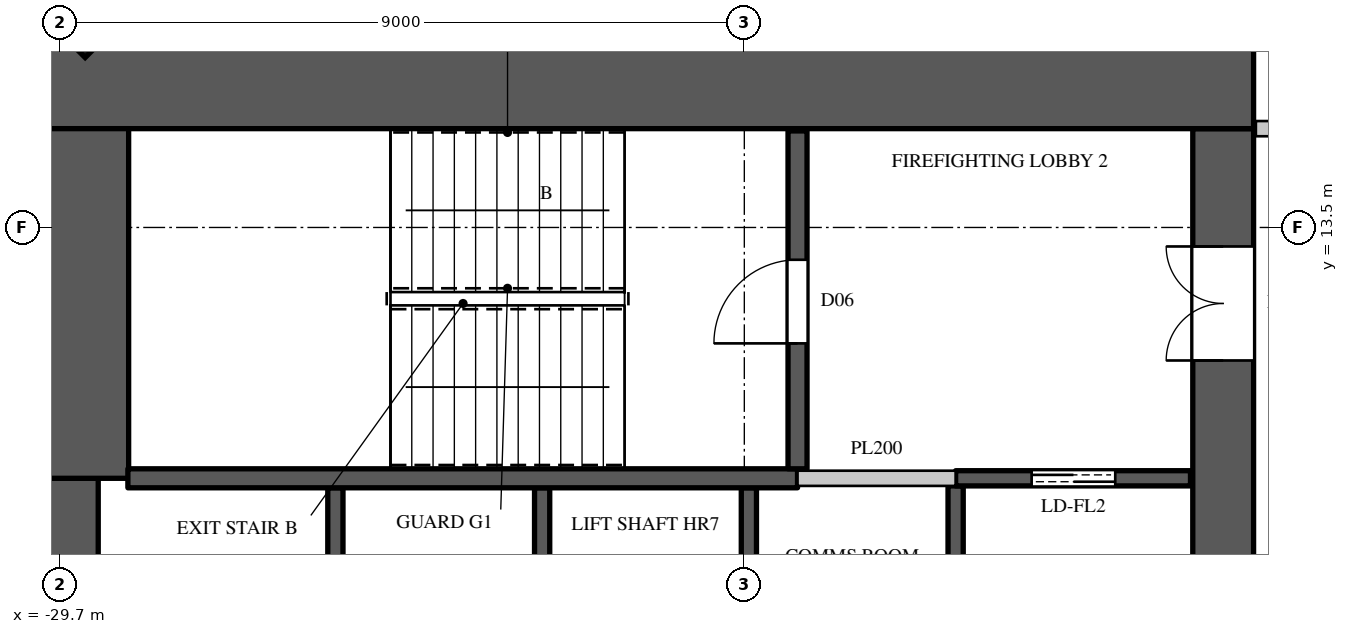
"""IFC4 building model, lengths in metres.
Left out: names, types, materials, properties, quantities, classifications, styles, units other than length and angle.
Written with IfcOpenShell. Run it as: python <this file> out.ifc"""

import sys

from ifc_helpers import new_model, si_unit, direction, frame, frame_2d, origin, origin_2d, place, context, subcontext, project, spatial, rectangle, extrude, element, fill, save


model = new_model("IFC4")
c1 = context("Model", 3, precision=1e-05, world=origin(), true_north=direction((0.0, 1.0)))
c2 = subcontext(c1, "Body", "Model", "MODEL_VIEW")
j1 = project(units=[si_unit("LENGTHUNIT", "METRE"), si_unit("PLANEANGLEUNIT", "RADIAN")], contexts=[c1])
p1 = place(None, origin())
s1 = spatial("IfcSite", under=j1, at=p1, CompositionType="ELEMENT")
p2 = place(p1, origin())
s2 = spatial("IfcBuilding", under=s1, at=p2, CompositionType="ELEMENT")
p3 = place(p2, frame((0.0, 0.0, 181.0)))
s3 = spatial("IfcBuildingStorey", under=s2, at=p3, CompositionType="ELEMENT", Elevation=181.0)
p4 = place(p3, frame((-29.443, 16.443, 0.0), z_axis=(0.0, 0.0, 1.0), x_axis=(-0.707106781187, -0.707106781187, 0.0)))
e1 = element("IfcColumn", 1, at=p4, inside=s3, PredefinedType="COLUMN", context=c2, shape_type="SweptSolid", body=[
    extrude(rectangle(XDim=0.9, YDim=1.1, at=origin_2d()), origin(), (0.0, 0.0, 1.0), 4.1),
])
p5 = place(p3, frame((-30.0, 15.4, 0.0), z_axis=(0.0, 0.0, 1.0), x_axis=(1.0, 0.0, 0.0)))
e2 = element("IfcWall", 2, at=p5, inside=s3, PredefinedType="SHEAR", context=c2, shape_type="SweptSolid", body=[
    extrude(rectangle(XDim=16.0, YDim=1.2, at=frame_2d((8.0, 0.0))), origin(), (0.0, 0.0, 1.0), 4.1),
])
p6 = place(p3, frame((-14.4, -14.8, 0.0), z_axis=(0.0, 0.0, 1.0), x_axis=(0.0, 1.0, 0.0)))
e3 = element("IfcWall", 3, at=p6, inside=s3, PredefinedType="SHEAR", context=c2, shape_type="SweptSolid", body=[
    extrude(rectangle(XDim=29.6, YDim=0.8, at=frame_2d((14.8, 0.0))), origin(), (0.0, 0.0, 1.0), 4.1),
])
p7 = place(p6, frame((1.55, 0.0, 0.0)))
e4 = element("IfcOpeningElement", 4, at=p7, cuts=e3, PredefinedType="OPENING", context=c2, shape_type="SweptSolid", body=[
    extrude(rectangle(XDim=1.5, YDim=2.4, at=frame_2d((0.75, 1.2))), frame((0.0, 0.41, 0.0), z_axis=(0.0, -1.0, 0.0), x_axis=(1.0, 0.0, 0.0)), (0.0, 0.0, 1.0), 0.82),
])
p8 = place(p6, frame((26.55, 0.0, 0.0)))
e5 = element("IfcOpeningElement", 5, at=p8, cuts=e3, PredefinedType="OPENING", context=c2, shape_type="SweptSolid", body=[
    extrude(rectangle(XDim=1.5, YDim=2.4, at=frame_2d((0.75, 1.2))), frame((0.0, 0.41, 0.0), z_axis=(0.0, -1.0, 0.0), x_axis=(1.0, 0.0, 0.0)), (0.0, 0.0, 1.0), 0.82),
])
p9 = place(p6, frame((8.45, 0.0, 0.0)))
e6 = element("IfcOpeningElement", 6, at=p9, cuts=e3, PredefinedType="OPENING", context=c2, shape_type="SweptSolid", body=[
    extrude(rectangle(XDim=1.5, YDim=2.4, at=frame_2d((0.75, 1.2))), frame((0.0, 0.41, 0.0), z_axis=(0.0, -1.0, 0.0), x_axis=(1.0, 0.0, 0.0)), (0.0, 0.0, 1.0), 0.82),
])
p10 = place(p6, frame((19.65, 0.0, 0.0)))
e7 = element("IfcOpeningElement", 7, at=p10, cuts=e3, PredefinedType="OPENING", context=c2, shape_type="SweptSolid", body=[
    extrude(rectangle(XDim=1.5, YDim=2.4, at=frame_2d((0.75, 1.2))), frame((0.0, 0.41, 0.0), z_axis=(0.0, -1.0, 0.0), x_axis=(1.0, 0.0, 0.0)), (0.0, 0.0, 1.0), 0.82),
])
p11 = place(p6, frame((14.5, 0.0, 0.0)))
e8 = element("IfcOpeningElement", 8, at=p11, cuts=e3, PredefinedType="OPENING", context=c2, shape_type="SweptSolid", body=[
    extrude(rectangle(XDim=0.6, YDim=2.0, at=frame_2d((0.3, 1.0))), frame((0.0, 0.41, 0.0), z_axis=(0.0, -1.0, 0.0), x_axis=(1.0, 0.0, 0.0)), (0.0, 0.0, 1.0), 0.82),
])
p12 = place(p3, frame((-29.6, -10.2, 0.0), z_axis=(0.0, 0.0, 1.0), x_axis=(0.0, 1.0, 0.0)))
e9 = element("IfcWall", 9, at=p12, inside=s3, PredefinedType="SHEAR", context=c2, shape_type="SweptSolid", body=[
    extrude(rectangle(XDim=20.4, YDim=0.8, at=frame_2d((10.2, 0.0))), origin(), (0.0, 0.0, 1.0), 4.1),
])
p13 = place(p3, frame((-29.4, 10.2, 0.0), z_axis=(0.0, 0.0, 1.0), x_axis=(0.0, 1.0, 0.0)))
e10 = element("IfcWall", 10, at=p13, inside=s3, PredefinedType="SHEAR", context=c2, shape_type="SweptSolid", body=[
    extrude(rectangle(XDim=4.6, YDim=1.2, at=frame_2d((2.3, 0.0))), origin(), (0.0, 0.0, 1.0), 4.1),
])
p14 = place(p3, frame((-13.97, 14.8, 0.0), z_axis=(0.0, 0.0, 1.0), x_axis=(1.0, 0.0, 0.0)))
e11 = element("IfcWall", 11, at=p14, inside=s3, PredefinedType="PARTITIONING", context=c2, shape_type="SweptSolid", body=[
    extrude(rectangle(XDim=2.87, YDim=0.2, at=frame_2d((1.435, 0.0))), origin(), (0.0, 0.0, 1.0), 3.8),
])
p15 = place(p3, frame((-20.0, 10.2, 0.0), z_axis=(0.0, 0.0, 1.0), x_axis=(1.0, 0.0, 0.0)))
e12 = element("IfcWall", 12, at=p15, inside=s3, PredefinedType="PARTITIONING", context=c2, shape_type="SweptSolid", body=[
    extrude(rectangle(XDim=2.08, YDim=0.2, at=frame_2d((1.04, 0.0))), origin(), (0.0, 0.0, 1.0), 3.8),
])
for number, where, z_axis, x_axis in (
    (13, (-26.08, 7.5, 0.0), (0.0, 0.0, 1.0), (0.0, 1.0, 0.0)),
    (14, (-23.36, 7.5, 0.0), (0.0, 0.0, 1.0), (0.0, 1.0, 0.0)),
):
    element("IfcWall", number, at=place(p3, frame(where, z_axis=z_axis, x_axis=x_axis)), inside=s3, PredefinedType="SHEAR", context=c2, shape_type="SweptSolid", body=[
        extrude(rectangle(XDim=2.575, YDim=0.2, at=frame_2d((1.288, 0.0))), origin(), (0.0, 0.0, 1.0), 4.1),
    ])
p16 = place(p3, frame((-20.64, 7.5, 0.0), z_axis=(0.0, 0.0, 1.0), x_axis=(0.0, 1.0, 0.0)))
e15 = element("IfcWall", 15, at=p16, inside=s3, PredefinedType="SHEAR", context=c2, shape_type="SweptSolid", body=[
    extrude(rectangle(XDim=2.575, YDim=0.2, at=frame_2d((1.288, 0.0))), origin(), (0.0, 0.0, 1.0), 3.8),
])
p17 = place(p3, frame((-17.92, 7.5, 0.0), z_axis=(0.0, 0.0, 1.0), x_axis=(0.0, 1.0, 0.0)))
e16 = element("IfcWall", 16, at=p17, inside=s3, PredefinedType="SHEAR", context=c2, shape_type="SweptSolid", body=[
    extrude(rectangle(XDim=2.6, YDim=0.2, at=frame_2d((1.3, 0.0))), origin(), (0.0, 0.0, 1.0), 3.8),
])
p18 = place(p3, frame((-17.92, 10.2, 0.0), z_axis=(0.0, 0.0, 1.0), x_axis=(1.0, 0.0, 0.0)))
e17 = element("IfcWall", 17, at=p18, inside=s3, PredefinedType="SHEAR", context=c2, shape_type="SweptSolid", body=[
    extrude(rectangle(XDim=3.09, YDim=0.2, at=frame_2d((1.545, 0.0))), origin(), (0.0, 0.0, 1.0), 3.8),
])
p19 = place(p18, frame((1.0, 0.0, 0.0)))
e18 = element("IfcOpeningElement", 18, at=p19, cuts=e17, PredefinedType="OPENING", context=c2, shape_type="SweptSolid", body=[
    extrude(rectangle(XDim=1.1, YDim=2.2, at=frame_2d((0.55, 1.1))), frame((0.0, 0.11, 0.0), z_axis=(0.0, -1.0, 0.0), x_axis=(1.0, 0.0, 0.0)), (0.0, 0.0, 1.0), 0.22),
])
p20 = place(p3, frame((-28.81, 10.2, 0.0), z_axis=(0.0, 0.0, 1.0), x_axis=(1.0, 0.0, 0.0)))
e19 = element("IfcWall", 19, at=p20, inside=s3, PredefinedType="SHEAR", context=c2, shape_type="SweptSolid", body=[
    extrude(rectangle(XDim=8.81, YDim=0.25, at=frame_2d((4.405, 0.0))), origin(), (0.0, 0.0, 1.0), 3.8),
])
p21 = place(p3, frame((-20.0, 10.325, 0.0), z_axis=(0.0, 0.0, 1.0), x_axis=(0.0, 1.0, 0.0)))
e20 = element("IfcWall", 20, at=p21, inside=s3, PredefinedType="SHEAR", context=c2, shape_type="SweptSolid", body=[
    extrude(rectangle(XDim=4.445, YDim=0.25, at=frame_2d((2.223, 0.0))), origin(), (0.0, 0.0, 1.0), 3.8),
])
p22 = place(p21, frame((1.65, 0.0, 0.0)))
e21 = element("IfcOpeningElement", 21, at=p22, cuts=e20, PredefinedType="OPENING", context=c2, shape_type="SweptSolid", body=[
    extrude(rectangle(XDim=1.1, YDim=2.2, at=frame_2d((0.55, 1.1))), frame((0.0, 0.135, 0.0), z_axis=(0.0, -1.0, 0.0), x_axis=(1.0, 0.0, 0.0)), (0.0, 0.0, 1.0), 0.27),
])
p23 = place(p22, origin())
e22 = element("IfcDoor", 22, at=p23, inside=s3, OperationType="SINGLE_SWING_LEFT", PredefinedType="DOOR", context=c2, shape_type="SweptSolid", body=[
    extrude(rectangle(XDim=1.1, YDim=2.2, at=frame_2d((0.55, 1.1))), frame((0.0, 0.025, 0.0), z_axis=(0.0, -1.0, 0.0), x_axis=(1.0, 0.0, 0.0)), (0.0, 0.0, 1.0), 0.05),
])
fill(e21, e22)
p24 = place(p19, origin())
e23 = element("IfcDoor", 23, at=p24, inside=s3, OperationType="DOUBLE_DOOR_SLIDING", PredefinedType="DOOR", context=c2, shape_type="SweptSolid", body=[
    extrude(rectangle(XDim=1.1, YDim=2.2, at=frame_2d((0.55, 1.1))), frame((0.0, 0.025, 0.0), z_axis=(0.0, -1.0, 0.0), x_axis=(1.0, 0.0, 0.0)), (0.0, 0.0, 1.0), 0.05),
])
fill(e18, e23)
p25 = place(p8, origin())
e24 = element("IfcDoor", 24, at=p25, inside=s3, OperationType="DOUBLE_DOOR_SINGLE_SWING", PredefinedType="DOOR", context=c2, shape_type="SweptSolid", body=[
    extrude(rectangle(XDim=1.5, YDim=2.4, at=frame_2d((0.75, 1.2))), frame((0.0, 0.395, 0.0), z_axis=(0.0, -1.0, 0.0), x_axis=(1.0, 0.0, 0.0)), (0.0, 0.0, 1.0), 0.05),
])
fill(e5, e24)
save(model, sys.argv[1])
